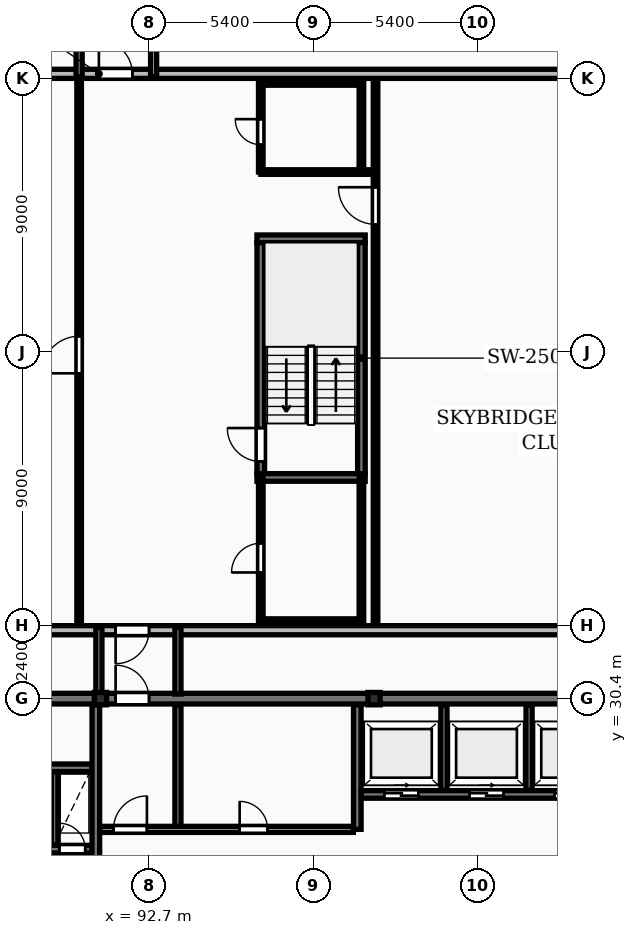
"""IFC4 building model, lengths in metres.
Left out: names, types, materials, properties, quantities, classifications, styles, units other than length and angle.
Written with IfcOpenShell. Run it as: python <this file> out.ifc"""

import sys

from ifc_helpers import new_model, si_unit, direction, frame, frame_2d, origin, origin_2d, place, context, subcontext, project, spatial, rectangle, i_section, extrude, element, fill, save


model = new_model("IFC4")
c1 = context("Model", 3, precision=1e-05, world=origin(), true_north=direction((0.0, 1.0)))
c2 = subcontext(c1, "Body", "Model", "MODEL_VIEW")
j1 = project(units=[si_unit("LENGTHUNIT", "METRE"), si_unit("PLANEANGLEUNIT", "RADIAN")], contexts=[c1])
p1 = place(None, origin())
s1 = spatial("IfcSite", under=j1, at=p1, CompositionType="ELEMENT")
p2 = place(p1, origin())
s2 = spatial("IfcBuilding", under=s1, at=p2, CompositionType="ELEMENT")
p3 = place(p2, frame((0.0, 0.0, 139.3)))
s3 = spatial("IfcBuildingStorey", under=s2, at=p3, CompositionType="ELEMENT", Elevation=139.3)
for number, where, z_axis, x_axis in (
    (1, (91.1, 30.4, 0.0), (0.0, 0.0, 1.0), (1.0, 0.0, 0.0)),
    (2, (100.1, 30.4, 0.0), (0.0, 0.0, 1.0), (1.0, 0.0, 0.0)),
):
    element("IfcColumn", number, at=place(p3, frame(where, z_axis=z_axis, x_axis=x_axis)), inside=s3, PredefinedType="COLUMN", context=c2, shape_type="SweptSolid", body=[
        extrude(i_section(OverallWidth=0.403, OverallDepth=0.406, WebThickness=0.027, FlangeThickness=0.043, FilletRadius=0.015, at=origin_2d()), origin(), (0.0, 0.0, 1.0), 3.6),
    ])
p4 = place(p3, frame((57.6, 50.95, 0.0), z_axis=(0.0, 0.0, 1.0), x_axis=(1.0, 0.0, 0.0)))
e3 = element("IfcWall", 3, at=p4, inside=s3, PredefinedType="STANDARD", context=c2, shape_type="SweptSolid", body=[
    extrude(rectangle(XDim=73.0, YDim=0.3, at=frame_2d((36.5, 0.0))), origin(), (0.0, 0.0, 1.0), 3.31),
])
p5 = place(p4, frame((15.225, 0.0, 0.85)))
e4 = element("IfcOpeningElement", 4, at=p5, cuts=e3, PredefinedType="OPENING", context=c2, shape_type="SweptSolid", body=[
    extrude(rectangle(XDim=1.8, YDim=1.8, at=frame_2d((0.9, 0.9))), frame((0.0, 0.16, 0.0), z_axis=(0.0, -1.0, 0.0), x_axis=(1.0, 0.0, 0.0)), (0.0, 0.0, 1.0), 0.32),
])
p6 = place(p4, frame((58.575, 0.0, 0.85)))
e5 = element("IfcOpeningElement", 5, at=p6, cuts=e3, PredefinedType="OPENING", context=c2, shape_type="SweptSolid", body=[
    extrude(rectangle(XDim=1.8, YDim=1.8, at=frame_2d((0.9, 0.9))), frame((0.0, 0.16, 0.0), z_axis=(0.0, -1.0, 0.0), x_axis=(1.0, 0.0, 0.0)), (0.0, 0.0, 1.0), 0.32),
])
p7 = place(p4, frame((33.45, 0.0, 0.0)))
e6 = element("IfcOpeningElement", 6, at=p7, cuts=e3, PredefinedType="OPENING", context=c2, shape_type="SweptSolid", body=[
    extrude(rectangle(XDim=1.1, YDim=2.1, at=frame_2d((0.55, 1.05))), frame((0.0, 0.16, 0.0), z_axis=(0.0, -1.0, 0.0), x_axis=(1.0, 0.0, 0.0)), (0.0, 0.0, 1.0), 0.32),
])
p8 = place(p3, frame((130.7, 32.65, 0.0), z_axis=(0.0, 0.0, 1.0), x_axis=(-1.0, 0.0, 0.0)))
e7 = element("IfcWall", 7, at=p8, inside=s3, PredefinedType="STANDARD", context=c2, shape_type="SweptSolid", body=[
    extrude(rectangle(XDim=58.0, YDim=0.3, at=frame_2d((29.0, 0.0))), origin(), (0.0, 0.0, 1.0), 3.31),
])
p9 = place(p8, frame((50.125, 0.0, 0.85)))
e8 = element("IfcOpeningElement", 8, at=p9, cuts=e7, PredefinedType="OPENING", context=c2, shape_type="SweptSolid", body=[
    extrude(rectangle(XDim=1.8, YDim=1.8, at=frame_2d((0.9, 0.9))), frame((0.0, 0.16, 0.0), z_axis=(0.0, -1.0, 0.0), x_axis=(1.0, 0.0, 0.0)), (0.0, 0.0, 1.0), 0.32),
])
p10 = place(p8, frame((6.775, 0.0, 0.85)))
e9 = element("IfcOpeningElement", 9, at=p10, cuts=e7, PredefinedType="OPENING", context=c2, shape_type="SweptSolid", body=[
    extrude(rectangle(XDim=1.8, YDim=1.8, at=frame_2d((0.9, 0.9))), frame((0.0, 0.16, 0.0), z_axis=(0.0, -1.0, 0.0), x_axis=(1.0, 0.0, 0.0)), (0.0, 0.0, 1.0), 0.32),
])
p11 = place(p8, frame((38.0, 0.0, 0.0)))
e10 = element("IfcOpeningElement", 10, at=p11, cuts=e7, PredefinedType="OPENING", context=c2, shape_type="SweptSolid", body=[
    extrude(rectangle(XDim=1.1, YDim=2.1, at=frame_2d((0.55, 1.05))), frame((0.0, 0.16, 0.0), z_axis=(0.0, -1.0, 0.0), x_axis=(1.0, 0.0, 0.0)), (0.0, 0.0, 1.0), 0.32),
])
for number, where, z_axis, x_axis in (
    (11, (90.4, 50.85, 0.0), (0.0, 0.0, 1.0), (0.0, 1.0, 0.0)),
    (12, (92.85, 50.85, 0.0), (0.0, 0.0, 1.0), (0.0, 1.0, 0.0)),
):
    element("IfcWall", number, at=place(p3, frame(where, z_axis=z_axis, x_axis=x_axis)), inside=s3, PredefinedType="PARTITIONING", context=c2, shape_type="SweptSolid", body=[
        extrude(rectangle(XDim=4.2, YDim=0.2, at=frame_2d((2.1, 0.0))), origin(), (0.0, 0.0, 1.0), 3.31),
    ])
p12 = place(p3, frame((81.925, 30.4, 0.0), z_axis=(0.0, 0.0, 1.0), x_axis=(1.0, 0.0, 0.0)))
e13 = element("IfcWall", 13, at=p12, inside=s3, PredefinedType="SHEAR", context=c2, shape_type="SweptSolid", body=[
    extrude(rectangle(XDim=36.265, YDim=0.35, at=frame_2d((18.132, 0.0))), origin(), (0.0, 0.0, 1.0), 3.6),
])
p13 = place(p12, frame((9.675, 0.0, 0.0)))
e14 = element("IfcOpeningElement", 14, at=p13, cuts=e13, PredefinedType="OPENING", context=c2, shape_type="SweptSolid", body=[
    extrude(rectangle(XDim=1.1, YDim=2.1, at=frame_2d((0.55, 1.05))), frame((0.0, 0.185, 0.0), z_axis=(0.0, -1.0, 0.0), x_axis=(1.0, 0.0, 0.0)), (0.0, 0.0, 1.0), 0.37),
])
p14 = place(p3, frame((83.0, 28.125, 0.0), z_axis=(0.0, 0.0, 1.0), x_axis=(1.0, 0.0, 0.0)))
e15 = element("IfcWall", 15, at=p14, inside=s3, PredefinedType="SHEAR", context=c2, shape_type="SweptSolid", body=[
    extrude(rectangle(XDim=7.82, YDim=0.25, at=frame_2d((3.91, 0.0))), origin(), (0.0, 0.0, 1.0), 3.6),
])
p15 = place(p3, frame((86.5, 25.45, 0.0), z_axis=(0.0, 0.0, 1.0), x_axis=(1.0, 0.0, 0.0)))
e16 = element("IfcWall", 16, at=p15, inside=s3, PredefinedType="SHEAR", context=c2, shape_type="SweptSolid", body=[
    extrude(rectangle(XDim=4.32, YDim=0.25, at=frame_2d((2.16, 0.0))), origin(), (0.0, 0.0, 1.0), 3.6),
])
p16 = place(p15, frame((1.14, 0.0, 0.0)))
e17 = element("IfcOpeningElement", 17, at=p16, cuts=e16, PredefinedType="OPENING", context=c2, shape_type="SweptSolid", body=[
    extrude(rectangle(XDim=1.12, YDim=2.12, at=frame_2d((0.56, 1.06))), frame((0.0, 0.135, 0.0), z_axis=(0.0, -1.0, 0.0), x_axis=(1.0, 0.0, 0.0)), (0.0, 0.0, 1.0), 0.27),
])
p17 = place(p15, frame((3.25, 0.0, 0.0)))
e18 = element("IfcOpeningElement", 18, at=p17, cuts=e16, PredefinedType="OPENING", context=c2, shape_type="SweptSolid", body=[
    extrude(rectangle(XDim=0.85, YDim=2.05, at=frame_2d((0.425, 1.025))), frame((0.0, 0.135, 0.0), z_axis=(0.0, -1.0, 0.0), x_axis=(1.0, 0.0, 0.0)), (0.0, 0.0, 1.0), 0.27),
])
p18 = place(p3, frame((89.6, 25.58, 0.0), z_axis=(0.0, 0.0, 1.0), x_axis=(0.0, 1.0, 0.0)))
e19 = element("IfcWall", 19, at=p18, inside=s3, PredefinedType="PARTITIONING", context=c2, shape_type="SweptSolid", body=[
    extrude(rectangle(XDim=2.42, YDim=0.2, at=frame_2d((1.21, 0.0))), origin(), (0.0, 0.0, 1.0), 3.31),
])
p19 = place(p3, frame((90.95, 18.6, 0.0), z_axis=(0.0, 0.0, 1.0), x_axis=(0.0, 1.0, 0.0)))
e20 = element("IfcWall", 20, at=p19, inside=s3, PredefinedType="SHEAR", context=c2, shape_type="SweptSolid", body=[
    extrude(rectangle(XDim=11.6, YDim=0.25, at=frame_2d((5.8, 0.0))), origin(), (0.0, 0.0, 1.0), 3.6),
])
p20 = place(p19, frame((4.6, 0.0, 0.0)))
e21 = element("IfcOpeningElement", 21, at=p20, cuts=e20, PredefinedType="OPENING", context=c2, shape_type="SweptSolid", body=[
    extrude(rectangle(XDim=1.1, YDim=2.1, at=frame_2d((0.55, 1.05))), frame((0.0, 0.135, 0.0), z_axis=(0.0, -1.0, 0.0), x_axis=(1.0, 0.0, 0.0)), (0.0, 0.0, 1.0), 0.27),
])
p21 = place(p3, frame((93.65, 26.1, 0.0), z_axis=(0.0, 0.0, 1.0), x_axis=(0.0, 1.0, 0.0)))
e22 = element("IfcWall", 22, at=p21, inside=s3, PredefinedType="PARTITIONING", context=c2, shape_type="SweptSolid", body=[
    extrude(rectangle(XDim=4.1, YDim=0.2, at=frame_2d((2.05, 0.0))), origin(), (0.0, 0.0, 1.0), 3.31),
])
p22 = place(p3, frame((91.08, 26.1, 0.0), z_axis=(0.0, 0.0, 1.0), x_axis=(1.0, 0.0, 0.0)))
e23 = element("IfcWall", 23, at=p22, inside=s3, PredefinedType="PARTITIONING", context=c2, shape_type="SweptSolid", body=[
    extrude(rectangle(XDim=8.34, YDim=0.2, at=frame_2d((4.17, 0.0))), origin(), (0.0, 0.0, 1.0), 3.31),
])
p23 = place(p22, frame((0.45, 0.0, 0.0)))
e24 = element("IfcOpeningElement", 24, at=p23, cuts=e23, PredefinedType="OPENING", context=c2, shape_type="SweptSolid", body=[
    extrude(rectangle(XDim=1.1, YDim=2.1, at=frame_2d((0.55, 1.05))), frame((0.0, 0.11, 0.0), z_axis=(0.0, -1.0, 0.0), x_axis=(1.0, 0.0, 0.0)), (0.0, 0.0, 1.0), 0.22),
])
p24 = place(p22, frame((4.6, 0.0, 0.0)))
e25 = element("IfcOpeningElement", 25, at=p24, cuts=e23, PredefinedType="OPENING", context=c2, shape_type="SweptSolid", body=[
    extrude(rectangle(XDim=0.92, YDim=2.08, at=frame_2d((0.46, 1.04))), frame((0.0, 0.11, 0.0), z_axis=(0.0, -1.0, 0.0), x_axis=(1.0, 0.0, 0.0)), (0.0, 0.0, 1.0), 0.22),
])
p25 = place(p3, frame((99.55, 26.1, 0.0), z_axis=(0.0, 0.0, 1.0), x_axis=(0.0, 1.0, 0.0)))
e26 = element("IfcWall", 26, at=p25, inside=s3, PredefinedType="SHEAR", context=c2, shape_type="SweptSolid", body=[
    extrude(rectangle(XDim=4.1, YDim=0.25, at=frame_2d((2.05, 0.0))), origin(), (0.0, 0.0, 1.0), 3.6),
])
for number, where, z_axis, x_axis in (
    (27, (102.4, 27.38, 0.0), (0.0, 0.0, 1.0), (0.0, 1.0, 0.0)),
    (28, (105.2, 27.38, 0.0), (0.0, 0.0, 1.0), (0.0, 1.0, 0.0)),
):
    element("IfcWall", number, at=place(p3, frame(where, z_axis=z_axis, x_axis=x_axis)), inside=s3, PredefinedType="PARTITIONING", context=c2, shape_type="SweptSolid", body=[
        extrude(rectangle(XDim=2.82, YDim=0.2, at=frame_2d((1.41, 0.0))), origin(), (0.0, 0.0, 1.0), 3.31),
    ])
p26 = place(p3, frame((99.68, 27.25, 0.0), z_axis=(0.0, 0.0, 1.0), x_axis=(1.0, 0.0, 0.0)))
e29 = element("IfcWall", 29, at=p26, inside=s3, PredefinedType="SHEAR", context=c2, shape_type="SweptSolid", body=[
    extrude(rectangle(XDim=10.54, YDim=0.25, at=frame_2d((5.27, 0.0))), origin(), (0.0, 0.0, 1.0), 3.6),
])
p27 = place(p26, frame((0.76, 0.0, 0.0)))
e30 = element("IfcOpeningElement", 30, at=p27, cuts=e29, PredefinedType="OPENING", context=c2, shape_type="SweptSolid", body=[
    extrude(rectangle(XDim=1.12, YDim=2.12, at=frame_2d((0.56, 1.06))), frame((0.0, 0.135, 0.0), z_axis=(0.0, -1.0, 0.0), x_axis=(1.0, 0.0, 0.0)), (0.0, 0.0, 1.0), 0.27),
])
p28 = place(p26, frame((3.56, 0.0, 0.0)))
e31 = element("IfcOpeningElement", 31, at=p28, cuts=e29, PredefinedType="OPENING", context=c2, shape_type="SweptSolid", body=[
    extrude(rectangle(XDim=1.12, YDim=2.12, at=frame_2d((0.56, 1.06))), frame((0.0, 0.135, 0.0), z_axis=(0.0, -1.0, 0.0), x_axis=(1.0, 0.0, 0.0)), (0.0, 0.0, 1.0), 0.27),
])
p29 = place(p26, frame((6.36, 0.0, 0.0)))
e32 = element("IfcOpeningElement", 32, at=p29, cuts=e29, PredefinedType="OPENING", context=c2, shape_type="SweptSolid", body=[
    extrude(rectangle(XDim=1.12, YDim=2.12, at=frame_2d((0.56, 1.06))), frame((0.0, 0.135, 0.0), z_axis=(0.0, -1.0, 0.0), x_axis=(1.0, 0.0, 0.0)), (0.0, 0.0, 1.0), 0.27),
])
p30 = place(p26, frame((8.92, 0.0, 0.0)))
e33 = element("IfcOpeningElement", 33, at=p30, cuts=e29, PredefinedType="OPENING", context=c2, shape_type="SweptSolid", body=[
    extrude(rectangle(XDim=0.85, YDim=2.05, at=frame_2d((0.425, 1.025))), frame((0.0, 0.135, 0.0), z_axis=(0.0, -1.0, 0.0), x_axis=(1.0, 0.0, 0.0)), (0.0, 0.0, 1.0), 0.27),
])
p31 = place(p3, frame((91.05, 30.55, 0.0), z_axis=(0.0, 0.0, 1.0), x_axis=(0.0, 1.0, 0.0)))
e34 = element("IfcWall", 34, at=p31, inside=s3, PredefinedType="PARTITIONING", context=c2, shape_type="SweptSolid", body=[
    extrude(rectangle(XDim=2.2, YDim=0.2, at=frame_2d((1.1, 0.0))), origin(), (0.0, 0.0, 1.0), 3.31),
])
p32 = place(p3, frame((93.65, 30.55, 0.0), z_axis=(0.0, 0.0, 1.0), x_axis=(0.0, 1.0, 0.0)))
e35 = element("IfcWall", 35, at=p32, inside=s3, PredefinedType="PARTITIONING", context=c2, shape_type="SweptSolid", body=[
    extrude(rectangle(XDim=2.2, YDim=0.2, at=frame_2d((1.1, 0.0))), origin(), (0.0, 0.0, 1.0), 2.383),
])
p33 = place(p3, frame((96.375, 37.8, 0.0), z_axis=(0.0, 0.0, 1.0), x_axis=(0.0, 1.0, 0.0)))
e36 = element("IfcWall", 36, at=p33, inside=s3, PredefinedType="SHEAR", context=c2, shape_type="SweptSolid", body=[
    extrude(rectangle(XDim=7.6, YDim=0.25, at=frame_2d((3.8, 0.0))), origin(), (0.0, 0.0, 1.0), 3.6),
])
p34 = place(p33, frame((0.4, 0.0, 0.0)))
e37 = element("IfcOpeningElement", 37, at=p34, cuts=e36, PredefinedType="OPENING", context=c2, shape_type="SweptSolid", body=[
    extrude(rectangle(XDim=1.1, YDim=2.1, at=frame_2d((0.55, 1.05))), frame((0.0, 0.135, 0.0), z_axis=(0.0, -1.0, 0.0), x_axis=(1.0, 0.0, 0.0)), (0.0, 0.0, 1.0), 0.27),
])
p35 = place(p3, frame((99.685, 37.8, 0.0), z_axis=(0.0, 0.0, 1.0), x_axis=(0.0, 1.0, 0.0)))
e38 = element("IfcWall", 38, at=p35, inside=s3, PredefinedType="SHEAR", context=c2, shape_type="SweptSolid", body=[
    extrude(rectangle(XDim=7.6, YDim=0.25, at=frame_2d((3.8, 0.0))), origin(), (0.0, 0.0, 1.0), 3.6),
])
for number, where, z_axis, x_axis in (
    (39, (96.25, 37.675, 0.0), (0.0, 0.0, 1.0), (1.0, 0.0, 0.0)),
    (40, (96.25, 45.525, 0.0), (0.0, 0.0, 1.0), (1.0, 0.0, 0.0)),
):
    element("IfcWall", number, at=place(p3, frame(where, z_axis=z_axis, x_axis=x_axis)), inside=s3, PredefinedType="SHEAR", context=c2, shape_type="SweptSolid", body=[
        extrude(rectangle(XDim=3.56, YDim=0.25, at=frame_2d((1.78, 0.0))), origin(), (0.0, 0.0, 1.0), 3.6),
    ])
for number, where, z_axis, x_axis in (
    (41, (96.375, 32.95, 0.0), (0.0, 0.0, 1.0), (1.0, 0.0, 0.0)),
    (42, (96.375, 50.65, 0.0), (0.0, 0.0, 1.0), (1.0, 0.0, 0.0)),
):
    element("IfcWall", number, at=place(p3, frame(where, z_axis=z_axis, x_axis=x_axis)), inside=s3, PredefinedType="PARTITIONING", context=c2, shape_type="SweptSolid", body=[
        extrude(rectangle(XDim=3.31, YDim=0.15, at=frame_2d((1.655, 0.0))), origin(), (0.0, 0.0, 1.0), 2.69),
    ])
p36 = place(p3, frame((96.375, 32.95, 0.0), z_axis=(0.0, 0.0, 1.0), x_axis=(0.0, 1.0, 0.0)))
e43 = element("IfcWall", 43, at=p36, inside=s3, PredefinedType="PARTITIONING", context=c2, shape_type="SweptSolid", body=[
    extrude(rectangle(XDim=4.725, YDim=0.15, at=frame_2d((2.363, 0.0))), origin(), (0.0, 0.0, 1.0), 2.383),
])
p37 = place(p36, frame((1.6, 0.0, 0.0)))
e44 = element("IfcOpeningElement", 44, at=p37, cuts=e43, PredefinedType="OPENING", context=c2, shape_type="SweptSolid", body=[
    extrude(rectangle(XDim=0.96, YDim=2.1, at=frame_2d((0.48, 1.05))), frame((0.0, 0.085, 0.0), z_axis=(0.0, -1.0, 0.0), x_axis=(1.0, 0.0, 0.0)), (0.0, 0.0, 1.0), 0.17),
])
p38 = place(p3, frame((96.375, 47.72, 0.0), z_axis=(0.0, 0.0, 1.0), x_axis=(0.0, 1.0, 0.0)))
e45 = element("IfcWall", 45, at=p38, inside=s3, PredefinedType="PARTITIONING", context=c2, shape_type="SweptSolid", body=[
    extrude(rectangle(XDim=2.93, YDim=0.15, at=frame_2d((1.465, 0.0))), origin(), (0.0, 0.0, 1.0), 2.383),
])
p39 = place(p38, frame((0.9, 0.0, 0.0)))
e46 = element("IfcOpeningElement", 46, at=p39, cuts=e45, PredefinedType="OPENING", context=c2, shape_type="SweptSolid", body=[
    extrude(rectangle(XDim=0.84, YDim=2.04, at=frame_2d((0.42, 1.02))), frame((0.0, 0.085, 0.0), z_axis=(0.0, -1.0, 0.0), x_axis=(1.0, 0.0, 0.0)), (0.0, 0.0, 1.0), 0.17),
])
p40 = place(p3, frame((96.375, 47.72, 0.0), z_axis=(0.0, 0.0, 1.0), x_axis=(1.0, 0.0, 0.0)))
e47 = element("IfcWall", 47, at=p40, inside=s3, PredefinedType="PARTITIONING", context=c2, shape_type="SweptSolid", body=[
    extrude(rectangle(XDim=3.775, YDim=0.15, at=frame_2d((1.887, 0.0))), origin(), (0.0, 0.0, 1.0), 3.31),
])
p41 = place(p3, frame((99.685, 32.95, 0.0), z_axis=(0.0, 0.0, 1.0), x_axis=(0.0, 1.0, 0.0)))
e48 = element("IfcWall", 48, at=p41, inside=s3, PredefinedType="PARTITIONING", context=c2, shape_type="SweptSolid", body=[
    extrude(rectangle(XDim=4.725, YDim=0.15, at=frame_2d((2.363, 0.0))), origin(), (0.0, 0.0, 1.0), 2.383),
])
p42 = place(p3, frame((99.685, 47.72, 0.0), z_axis=(0.0, 0.0, 1.0), x_axis=(0.0, 1.0, 0.0)))
e49 = element("IfcWall", 49, at=p42, inside=s3, PredefinedType="PARTITIONING", context=c2, shape_type="SweptSolid", body=[
    extrude(rectangle(XDim=2.93, YDim=0.15, at=frame_2d((1.465, 0.0))), origin(), (0.0, 0.0, 1.0), 2.383),
])
p43 = place(p3, frame((90.4, 32.9, 0.0), z_axis=(0.0, 0.0, 1.0), x_axis=(0.0, 1.0, 0.0)))
e50 = element("IfcWall", 50, at=p43, inside=s3, PredefinedType="PARTITIONING", context=c2, shape_type="SweptSolid", body=[
    extrude(rectangle(XDim=17.8, YDim=0.15, at=frame_2d((8.9, 0.0))), origin(), (0.0, 0.0, 1.0), 3.31),
])
p44 = place(p43, frame((8.2, 0.0, 0.0)))
e51 = element("IfcOpeningElement", 51, at=p44, cuts=e50, PredefinedType="OPENING", context=c2, shape_type="SweptSolid", body=[
    extrude(rectangle(XDim=1.22, YDim=2.18, at=frame_2d((0.61, 1.09))), frame((0.0, 0.085, 0.0), z_axis=(0.0, -1.0, 0.0), x_axis=(1.0, 0.0, 0.0)), (0.0, 0.0, 1.0), 0.17),
])
p45 = place(p3, frame((100.15, 32.9, 0.0), z_axis=(0.0, 0.0, 1.0), x_axis=(0.0, 1.0, 0.0)))
e52 = element("IfcWall", 52, at=p45, inside=s3, PredefinedType="PARTITIONING", context=c2, shape_type="SweptSolid", body=[
    extrude(rectangle(XDim=17.8, YDim=0.15, at=frame_2d((8.9, 0.0))), origin(), (0.0, 0.0, 1.0), 3.31),
])
p46 = place(p45, frame((13.1, 0.0, 0.0)))
e53 = element("IfcOpeningElement", 53, at=p46, cuts=e52, PredefinedType="OPENING", context=c2, shape_type="SweptSolid", body=[
    extrude(rectangle(XDim=1.22, YDim=2.18, at=frame_2d((0.61, 1.09))), frame((0.0, 0.085, 0.0), z_axis=(0.0, -1.0, 0.0), x_axis=(1.0, 0.0, 0.0)), (0.0, 0.0, 1.0), 0.17),
])
p47 = place(p7, origin())
e54 = element("IfcDoor", 54, at=p47, inside=s3, OperationType="SINGLE_SWING_LEFT", PredefinedType="DOOR", context=c2, shape_type="SweptSolid", body=[
    extrude(rectangle(XDim=1.1, YDim=2.1, at=frame_2d((0.55, 1.05))), frame((0.0, 0.025, 0.0), z_axis=(0.0, -1.0, 0.0), x_axis=(1.0, 0.0, 0.0)), (0.0, 0.0, 1.0), 0.05),
])
fill(e6, e54)
p48 = place(p11, origin())
e55 = element("IfcDoor", 55, at=p48, inside=s3, OperationType="SINGLE_SWING_RIGHT", PredefinedType="DOOR", context=c2, shape_type="SweptSolid", body=[
    extrude(rectangle(XDim=1.1, YDim=2.1, at=frame_2d((0.55, 1.05))), frame((0.0, 0.025, 0.0), z_axis=(0.0, -1.0, 0.0), x_axis=(1.0, 0.0, 0.0)), (0.0, 0.0, 1.0), 0.05),
])
fill(e10, e55)
p49 = place(p13, origin())
e56 = element("IfcDoor", 56, at=p49, inside=s3, OperationType="SINGLE_SWING_LEFT", PredefinedType="DOOR", context=c2, shape_type="SweptSolid", body=[
    extrude(rectangle(XDim=1.1, YDim=2.1, at=frame_2d((0.55, 1.05))), frame((0.0, 0.025, 0.0), z_axis=(0.0, -1.0, 0.0), x_axis=(1.0, 0.0, 0.0)), (0.0, 0.0, 1.0), 0.05),
])
fill(e14, e56)
p50 = place(p17, origin())
e57 = element("IfcDoor", 57, at=p50, inside=s3, OperationType="SINGLE_SWING_LEFT", PredefinedType="DOOR", context=c2, shape_type="SweptSolid", body=[
    extrude(rectangle(XDim=0.85, YDim=2.05, at=frame_2d((0.425, 1.025))), frame((0.0, 0.025, 0.0), z_axis=(0.0, -1.0, 0.0), x_axis=(1.0, 0.0, 0.0)), (0.0, 0.0, 1.0), 0.05),
])
fill(e18, e57)
p51 = place(p23, origin())
e58 = element("IfcDoor", 58, at=p51, inside=s3, OperationType="SINGLE_SWING_RIGHT", PredefinedType="DOOR", context=c2, shape_type="SweptSolid", body=[
    extrude(rectangle(XDim=1.1, YDim=2.1, at=frame_2d((0.55, 1.05))), frame((0.0, 0.025, 0.0), z_axis=(0.0, -1.0, 0.0), x_axis=(1.0, 0.0, 0.0)), (0.0, 0.0, 1.0), 0.05),
])
fill(e24, e58)
p52 = place(p24, origin())
e59 = element("IfcDoor", 59, at=p52, inside=s3, OperationType="SINGLE_SWING_LEFT", PredefinedType="DOOR", context=c2, shape_type="SweptSolid", body=[
    extrude(rectangle(XDim=0.92, YDim=2.08, at=frame_2d((0.46, 1.04))), frame((0.0, 0.025, 0.0), z_axis=(0.0, -1.0, 0.0), x_axis=(1.0, 0.0, 0.0)), (0.0, 0.0, 1.0), 0.05),
])
fill(e25, e59)
p53 = place(p27, origin())
e60 = element("IfcDoor", 60, at=p53, inside=s3, OperationType="SLIDING_TO_RIGHT", PredefinedType="DOOR", context=c2, shape_type="SweptSolid", body=[
    extrude(rectangle(XDim=1.12, YDim=2.12, at=frame_2d((0.56, 1.06))), frame((0.0, 0.025, 0.0), z_axis=(0.0, -1.0, 0.0), x_axis=(1.0, 0.0, 0.0)), (0.0, 0.0, 1.0), 0.05),
])
fill(e30, e60)
p54 = place(p28, origin())
e61 = element("IfcDoor", 61, at=p54, inside=s3, OperationType="SLIDING_TO_RIGHT", PredefinedType="DOOR", context=c2, shape_type="SweptSolid", body=[
    extrude(rectangle(XDim=1.12, YDim=2.12, at=frame_2d((0.56, 1.06))), frame((0.0, 0.025, 0.0), z_axis=(0.0, -1.0, 0.0), x_axis=(1.0, 0.0, 0.0)), (0.0, 0.0, 1.0), 0.05),
])
fill(e31, e61)
p55 = place(p29, origin())
e62 = element("IfcDoor", 62, at=p55, inside=s3, OperationType="SLIDING_TO_RIGHT", PredefinedType="DOOR", context=c2, shape_type="SweptSolid", body=[
    extrude(rectangle(XDim=1.12, YDim=2.12, at=frame_2d((0.56, 1.06))), frame((0.0, 0.025, 0.0), z_axis=(0.0, -1.0, 0.0), x_axis=(1.0, 0.0, 0.0)), (0.0, 0.0, 1.0), 0.05),
])
fill(e32, e62)
p56 = place(p34, origin())
e63 = element("IfcDoor", 63, at=p56, inside=s3, OperationType="SINGLE_SWING_RIGHT", PredefinedType="DOOR", context=c2, shape_type="SweptSolid", body=[
    extrude(rectangle(XDim=1.1, YDim=2.1, at=frame_2d((0.55, 1.05))), frame((0.0, 0.025, 0.0), z_axis=(0.0, -1.0, 0.0), x_axis=(1.0, 0.0, 0.0)), (0.0, 0.0, 1.0), 0.05),
])
fill(e37, e63)
p57 = place(p37, origin())
e64 = element("IfcDoor", 64, at=p57, inside=s3, OperationType="SINGLE_SWING_LEFT", PredefinedType="DOOR", context=c2, shape_type="SweptSolid", body=[
    extrude(rectangle(XDim=0.96, YDim=2.1, at=frame_2d((0.48, 1.05))), frame((0.0, 0.025, 0.0), z_axis=(0.0, -1.0, 0.0), x_axis=(1.0, 0.0, 0.0)), (0.0, 0.0, 1.0), 0.05),
])
fill(e44, e64)
p58 = place(p39, origin())
e65 = element("IfcDoor", 65, at=p58, inside=s3, OperationType="SINGLE_SWING_RIGHT", PredefinedType="DOOR", context=c2, shape_type="SweptSolid", body=[
    extrude(rectangle(XDim=0.84, YDim=2.04, at=frame_2d((0.42, 1.02))), frame((0.0, 0.025, 0.0), z_axis=(0.0, -1.0, 0.0), x_axis=(1.0, 0.0, 0.0)), (0.0, 0.0, 1.0), 0.05),
])
fill(e46, e65)
p59 = place(p44, origin())
e66 = element("IfcDoor", 66, at=p59, inside=s3, OperationType="SINGLE_SWING_LEFT", PredefinedType="DOOR", context=c2, shape_type="SweptSolid", body=[
    extrude(rectangle(XDim=1.22, YDim=2.18, at=frame_2d((0.61, 1.09))), frame((0.0, 0.025, 0.0), z_axis=(0.0, -1.0, 0.0), x_axis=(1.0, 0.0, 0.0)), (0.0, 0.0, 1.0), 0.05),
])
fill(e51, e66)
p60 = place(p46, origin())
e67 = element("IfcDoor", 67, at=p60, inside=s3, OperationType="SINGLE_SWING_RIGHT", PredefinedType="DOOR", context=c2, shape_type="SweptSolid", body=[
    extrude(rectangle(XDim=1.22, YDim=2.18, at=frame_2d((0.61, 1.09))), frame((0.0, 0.025, 0.0), z_axis=(0.0, -1.0, 0.0), x_axis=(1.0, 0.0, 0.0)), (0.0, 0.0, 1.0), 0.05),
])
fill(e53, e67)
save(model, sys.argv[1])
